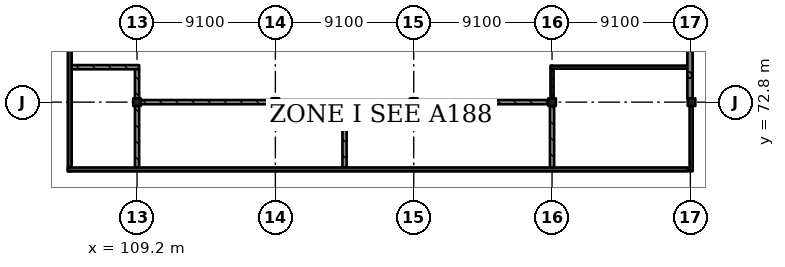
"""IFC4 building model, lengths in metres.
Left out: names, types, materials, properties, quantities, classifications, styles, units other than length and angle.
Written with IfcOpenShell. Run it as: python <this file> out.ifc"""

import sys

from ifc_helpers import new_model, si_unit, direction, frame, frame_2d, origin, origin_2d, place, context, subcontext, project, spatial, rectangle, extrude, element, fill, save


model = new_model("IFC4")
c1 = context("Model", 3, precision=1e-05, world=origin(), true_north=direction((0.0, 1.0)))
c2 = subcontext(c1, "Body", "Model", "MODEL_VIEW")
j1 = project(units=[si_unit("LENGTHUNIT", "METRE"), si_unit("PLANEANGLEUNIT", "RADIAN")], contexts=[c1])
p1 = place(None, origin())
s1 = spatial("IfcSite", under=j1, at=p1, CompositionType="ELEMENT")
p2 = place(p1, origin())
s2 = spatial("IfcBuilding", under=s1, at=p2, CompositionType="ELEMENT")
p3 = place(p2, frame((0.0, 0.0, 29.12)))
s3 = spatial("IfcBuildingStorey", under=s2, at=p3, CompositionType="ELEMENT", Elevation=29.12)
for number, where, z_axis, x_axis in (
    (1, (109.2, 72.8, 0.0), (0.0, 0.0, 1.0), (1.0, 0.0, 0.0)),
    (2, (118.3, 72.8, 0.0), (0.0, 0.0, 1.0), (1.0, 0.0, 0.0)),
    (3, (127.4, 72.8, 0.0), (0.0, 0.0, 1.0), (1.0, 0.0, 0.0)),
    (4, (136.5, 72.8, 0.0), (0.0, 0.0, 1.0), (1.0, 0.0, 0.0)),
    (5, (145.675, 72.8, 0.0), (0.0, 0.0, 1.0), (1.0, 0.0, 0.0)),
):
    element("IfcColumn", number, at=place(p3, frame(where, z_axis=z_axis, x_axis=x_axis)), inside=s3, PredefinedType="COLUMN", context=c2, shape_type="SweptSolid", body=[
        extrude(rectangle(XDim=0.5, YDim=0.5, at=origin_2d()), origin(), (0.0, 0.0, 1.0), 4.55),
    ])
p4 = place(p3, frame((104.775, 68.25, 0.0), z_axis=(0.0, 0.0, 1.0), x_axis=(0.0, 1.0, 0.0)))
e6 = element("IfcWall", 6, at=p4, inside=s3, PredefinedType="SHEAR", context=c2, shape_type="SweptSolid", body=[
    extrude(rectangle(XDim=40.775, YDim=0.25, at=frame_2d((20.387, 0.0))), origin(), (0.0, 0.0, 1.0), 4.55),
])
p5 = place(p3, frame((104.65, 68.375, 0.0), z_axis=(0.0, 0.0, 1.0), x_axis=(1.0, 0.0, 0.0)))
e7 = element("IfcWall", 7, at=p5, inside=s3, PredefinedType="SHEAR", context=c2, shape_type="SweptSolid", body=[
    extrude(rectangle(XDim=40.775, YDim=0.25, at=frame_2d((20.388, 0.0))), origin(), (0.0, 0.0, 1.0), 4.55),
])
p6 = place(p3, frame((145.65, 68.25, 0.0), z_axis=(0.0, 0.0, 1.0), x_axis=(0.0, 1.0, 0.0)))
e8 = element("IfcWall", 8, at=p6, inside=s3, PredefinedType="SOLIDWALL", context=c2, shape_type="SweptSolid", body=[
    extrude(rectangle(XDim=4.3, YDim=0.2, at=frame_2d((2.15, 0.0))), origin(), (0.0, 0.0, 1.0), 4.5),
])
p7 = place(p6, frame((0.65, 0.0, 0.6)))
e9 = element("IfcOpeningElement", 9, at=p7, cuts=e8, PredefinedType="OPENING", context=c2, shape_type="SweptSolid", body=[
    extrude(rectangle(XDim=3.0, YDim=3.0, at=frame_2d((1.5, 1.5))), frame((0.0, 0.11, 0.0), z_axis=(0.0, -1.0, 0.0), x_axis=(1.0, 0.0, 0.0)), (0.0, 0.0, 1.0), 0.22),
])
p8 = place(p3, frame((145.575, 73.05, 0.0), z_axis=(0.0, 0.0, 1.0), x_axis=(0.0, 1.0, 0.0)))
e10 = element("IfcWall", 10, at=p8, inside=s3, PredefinedType="SOLIDWALL", context=c2, shape_type="SweptSolid", body=[
    extrude(rectangle(XDim=8.6, YDim=0.35, at=frame_2d((4.3, 0.0))), origin(), (0.0, 0.0, 1.0), 4.5),
])
p9 = place(p3, frame((104.9, 75.1, 0.0), z_axis=(0.0, 0.0, 1.0), x_axis=(1.0, 0.0, 0.0)))
e11 = element("IfcWall", 11, at=p9, inside=s3, PredefinedType="SOLIDWALL", context=c2, shape_type="SweptSolid", body=[
    extrude(rectangle(XDim=4.438, YDim=0.275, at=frame_2d((2.219, 0.0))), origin(), (0.0, 0.0, 1.0), 3.88),
])
p10 = place(p9, frame((1.65, 0.0, 0.0)))
e12 = element("IfcOpeningElement", 12, at=p10, cuts=e11, PredefinedType="OPENING", context=c2, shape_type="SweptSolid", body=[
    extrude(rectangle(XDim=1.2, YDim=2.4, at=frame_2d((0.6, 1.2))), frame((0.0, 0.147, 0.0), z_axis=(0.0, -1.0, 0.0), x_axis=(1.0, 0.0, 0.0)), (0.0, 0.0, 1.0), 0.295),
])
p11 = place(p3, frame((109.2, 68.5, 0.0), z_axis=(0.0, 0.0, 1.0), x_axis=(0.0, 1.0, 0.0)))
e13 = element("IfcWall", 13, at=p11, inside=s3, PredefinedType="SOLIDWALL", context=c2, shape_type="SweptSolid", body=[
    extrude(rectangle(XDim=4.05, YDim=0.275, at=frame_2d((2.025, 0.0))), origin(), (0.0, 0.0, 1.0), 3.88),
])
p12 = place(p3, frame((109.2, 74.962, 0.0), z_axis=(0.0, 0.0, 1.0), x_axis=(0.0, -1.0, 0.0)))
e14 = element("IfcWall", 14, at=p12, inside=s3, PredefinedType="SOLIDWALL", context=c2, shape_type="SweptSolid", body=[
    extrude(rectangle(XDim=1.912, YDim=0.275, at=frame_2d((0.956, 0.0))), origin(), (0.0, 0.0, 1.0), 3.88),
])
p13 = place(p3, frame((109.45, 72.8, 0.0), z_axis=(0.0, 0.0, 1.0), x_axis=(1.0, 0.0, 0.0)))
e15 = element("IfcWall", 15, at=p13, inside=s3, PredefinedType="SOLIDWALL", context=c2, shape_type="SweptSolid", body=[
    extrude(rectangle(XDim=8.6, YDim=0.275, at=frame_2d((4.3, 0.0))), origin(), (0.0, 0.0, 1.0), 3.88),
])
p14 = place(p13, frame((3.65, 0.0, 0.0)))
e16 = element("IfcOpeningElement", 16, at=p14, cuts=e15, PredefinedType="OPENING", context=c2, shape_type="SweptSolid", body=[
    extrude(rectangle(XDim=1.2, YDim=2.4, at=frame_2d((0.6, 1.2))), frame((0.0, 0.147, 0.0), z_axis=(0.0, -1.0, 0.0), x_axis=(1.0, 0.0, 0.0)), (0.0, 0.0, 1.0), 0.295),
])
p15 = place(p3, frame((118.55, 72.8, 0.0), z_axis=(0.0, 0.0, 1.0), x_axis=(1.0, 0.0, 0.0)))
e17 = element("IfcWall", 17, at=p15, inside=s3, PredefinedType="SOLIDWALL", context=c2, shape_type="SweptSolid", body=[
    extrude(rectangle(XDim=8.6, YDim=0.275, at=frame_2d((4.3, 0.0))), origin(), (0.0, 0.0, 1.0), 3.88),
])
p16 = place(p3, frame((122.85, 68.5, 0.0), z_axis=(0.0, 0.0, 1.0), x_axis=(0.0, 1.0, 0.0)))
e18 = element("IfcWall", 18, at=p16, inside=s3, PredefinedType="SOLIDWALL", context=c2, shape_type="SweptSolid", body=[
    extrude(rectangle(XDim=4.163, YDim=0.275, at=frame_2d((2.081, 0.0))), origin(), (0.0, 0.0, 1.0), 3.88),
])
p17 = place(p3, frame((127.65, 72.8, 0.0), z_axis=(0.0, 0.0, 1.0), x_axis=(1.0, 0.0, 0.0)))
e19 = element("IfcWall", 19, at=p17, inside=s3, PredefinedType="SOLIDWALL", context=c2, shape_type="SweptSolid", body=[
    extrude(rectangle(XDim=8.6, YDim=0.275, at=frame_2d((4.3, 0.0))), origin(), (0.0, 0.0, 1.0), 3.88),
])
p18 = place(p17, frame((3.65, 0.0, 0.0)))
e20 = element("IfcOpeningElement", 20, at=p18, cuts=e19, PredefinedType="OPENING", context=c2, shape_type="SweptSolid", body=[
    extrude(rectangle(XDim=1.2, YDim=2.4, at=frame_2d((0.6, 1.2))), frame((0.0, 0.147, 0.0), z_axis=(0.0, -1.0, 0.0), x_axis=(1.0, 0.0, 0.0)), (0.0, 0.0, 1.0), 0.295),
])
p19 = place(p3, frame((136.5, 72.55, 0.0), z_axis=(0.0, 0.0, 1.0), x_axis=(0.0, -1.0, 0.0)))
e21 = element("IfcWall", 21, at=p19, inside=s3, PredefinedType="SOLIDWALL", context=c2, shape_type="SweptSolid", body=[
    extrude(rectangle(XDim=4.05, YDim=0.275, at=frame_2d((2.025, 0.0))), origin(), (0.0, 0.0, 1.0), 3.88),
])
p20 = place(p3, frame((136.5, 75.0, 0.0), z_axis=(0.0, 0.0, 1.0), x_axis=(0.0, -1.0, 0.0)))
e22 = element("IfcWall", 22, at=p20, inside=s3, PredefinedType="PARTITIONING", context=c2, shape_type="SweptSolid", body=[
    extrude(rectangle(XDim=1.95, YDim=0.2, at=frame_2d((0.975, 0.0))), origin(), (0.0, 0.0, 1.0), 3.88),
])
p21 = place(p3, frame((145.4, 75.1, 0.0), z_axis=(0.0, 0.0, 1.0), x_axis=(-1.0, 0.0, 0.0)))
e23 = element("IfcWall", 23, at=p21, inside=s3, PredefinedType="PARTITIONING", context=c2, shape_type="SweptSolid", body=[
    extrude(rectangle(XDim=9.0, YDim=0.2, at=frame_2d((4.5, 0.0))), origin(), (0.0, 0.0, 1.0), 3.88),
])
p22 = place(p21, frame((1.05, 0.0, 0.0)))
e24 = element("IfcOpeningElement", 24, at=p22, cuts=e23, PredefinedType="OPENING", context=c2, shape_type="SweptSolid", body=[
    extrude(rectangle(XDim=2.4, YDim=2.4, at=frame_2d((1.2, 1.2))), frame((0.0, 0.11, 0.0), z_axis=(0.0, -1.0, 0.0), x_axis=(1.0, 0.0, 0.0)), (0.0, 0.0, 1.0), 0.22),
])
p23 = place(p21, frame((5.55, 0.0, 0.0)))
e25 = element("IfcOpeningElement", 25, at=p23, cuts=e23, PredefinedType="OPENING", context=c2, shape_type="SweptSolid", body=[
    extrude(rectangle(XDim=2.4, YDim=2.4, at=frame_2d((1.2, 1.2))), frame((0.0, 0.11, 0.0), z_axis=(0.0, -1.0, 0.0), x_axis=(1.0, 0.0, 0.0)), (0.0, 0.0, 1.0), 0.22),
])
p24 = place(p7, origin())
e26 = element("IfcWindow", 26, at=p24, inside=s3, PartitioningType="SINGLE_PANEL", PredefinedType="WINDOW", context=c2, shape_type="SweptSolid", body=[
    extrude(rectangle(XDim=3.0, YDim=3.0, at=frame_2d((1.5, 1.5))), frame((0.0, 0.03, 0.0), z_axis=(0.0, -1.0, 0.0), x_axis=(1.0, 0.0, 0.0)), (0.0, 0.0, 1.0), 0.06),
])
fill(e9, e26)
p25 = place(p18, origin())
e27 = element("IfcDoor", 27, at=p25, inside=s3, OperationType="SINGLE_SWING_LEFT", PredefinedType="DOOR", context=c2, shape_type="SweptSolid", body=[
    extrude(rectangle(XDim=1.2, YDim=2.4, at=frame_2d((0.6, 1.2))), frame((0.0, 0.025, 0.0), z_axis=(0.0, -1.0, 0.0), x_axis=(1.0, 0.0, 0.0)), (0.0, 0.0, 1.0), 0.05),
])
fill(e20, e27)
p26 = place(p14, origin())
e28 = element("IfcDoor", 28, at=p26, inside=s3, OperationType="SINGLE_SWING_LEFT", PredefinedType="DOOR", context=c2, shape_type="SweptSolid", body=[
    extrude(rectangle(XDim=1.2, YDim=2.4, at=frame_2d((0.6, 1.2))), frame((0.0, 0.025, 0.0), z_axis=(0.0, -1.0, 0.0), x_axis=(1.0, 0.0, 0.0)), (0.0, 0.0, 1.0), 0.05),
])
fill(e16, e28)
p27 = place(p10, origin())
e29 = element("IfcDoor", 29, at=p27, inside=s3, OperationType="SINGLE_SWING_RIGHT", PredefinedType="DOOR", context=c2, shape_type="SweptSolid", body=[
    extrude(rectangle(XDim=1.2, YDim=2.4, at=frame_2d((0.6, 1.2))), frame((0.0, 0.025, 0.0), z_axis=(0.0, -1.0, 0.0), x_axis=(1.0, 0.0, 0.0)), (0.0, 0.0, 1.0), 0.05),
])
fill(e12, e29)
p28 = place(p22, origin())
e30 = element("IfcDoor", 30, at=p28, inside=s3, OperationType="DOUBLE_DOOR_SINGLE_SWING", PredefinedType="DOOR", context=c2, shape_type="SweptSolid", body=[
    extrude(rectangle(XDim=2.4, YDim=2.4, at=frame_2d((1.2, 1.2))), frame((0.0, 0.025, 0.0), z_axis=(0.0, -1.0, 0.0), x_axis=(1.0, 0.0, 0.0)), (0.0, 0.0, 1.0), 0.05),
])
fill(e24, e30)
p29 = place(p23, origin())
e31 = element("IfcDoor", 31, at=p29, inside=s3, OperationType="DOUBLE_DOOR_SINGLE_SWING", PredefinedType="DOOR", context=c2, shape_type="SweptSolid", body=[
    extrude(rectangle(XDim=2.4, YDim=2.4, at=frame_2d((1.2, 1.2))), frame((0.0, 0.025, 0.0), z_axis=(0.0, -1.0, 0.0), x_axis=(1.0, 0.0, 0.0)), (0.0, 0.0, 1.0), 0.05),
])
fill(e25, e31)
save(model, sys.argv[1])
